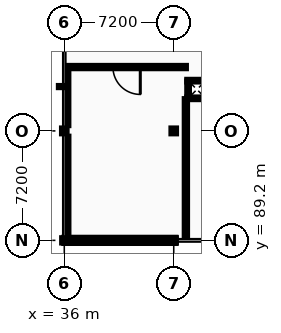
"""IFC4 building model, lengths in metres.
Left out: names, types, materials, properties, quantities, classifications, styles, units other than length and angle.
Written with IfcOpenShell. Run it as: python <this file> out.ifc"""

import sys

from ifc_helpers import new_model, si_unit, direction, frame, frame_2d, origin, origin_2d, place, context, subcontext, project, spatial, rectangle, i_section, extrude, element, fill, save


model = new_model("IFC4")
c1 = context("Model", 3, precision=1e-05, world=origin(), true_north=direction((0.0, 1.0)))
c2 = subcontext(c1, "Body", "Model", "MODEL_VIEW")
j1 = project(units=[si_unit("LENGTHUNIT", "METRE"), si_unit("PLANEANGLEUNIT", "RADIAN")], contexts=[c1])
p1 = place(None, origin())
s1 = spatial("IfcSite", under=j1, at=p1, CompositionType="ELEMENT")
p2 = place(p1, origin())
s2 = spatial("IfcBuilding", under=s1, at=p2, CompositionType="ELEMENT")
p3 = place(p2, frame((0.0, 0.0, 18.4)))
s3 = spatial("IfcBuildingStorey", under=s2, at=p3, CompositionType="ELEMENT", Elevation=18.4)
p4 = place(p3, frame((36.0, 89.2, 0.0), z_axis=(0.0, 0.0, 1.0), x_axis=(1.0, 0.0, 0.0)))
e1 = element("IfcColumn", 1, at=p4, inside=s3, PredefinedType="COLUMN", context=c2, shape_type="SweptSolid", body=[
    extrude(i_section(OverallWidth=0.28, OverallDepth=0.28, WebThickness=0.01, FlangeThickness=0.018, FilletRadius=0.024, at=origin_2d()), origin(), (0.0, 0.0, 1.0), 4.4),
])
p5 = place(p3, frame((36.0, 96.4, 0.0), z_axis=(0.0, 0.0, 1.0), x_axis=(1.0, 0.0, 0.0)))
e2 = element("IfcColumn", 2, at=p5, inside=s3, PredefinedType="COLUMN", context=c2, shape_type="SweptSolid", body=[
    extrude(i_section(OverallWidth=0.3, OverallDepth=0.32, WebThickness=0.011, FlangeThickness=0.021, FilletRadius=0.027, at=origin_2d()), origin(), (0.0, 0.0, 1.0), 4.4),
])
p6 = place(p3, frame((43.2, 89.2, 0.0), z_axis=(0.0, 0.0, 1.0), x_axis=(1.0, 0.0, 0.0)))
e3 = element("IfcColumn", 3, at=p6, inside=s3, PredefinedType="COLUMN", context=c2, shape_type="SweptSolid", body=[
    extrude(i_section(OverallWidth=0.28, OverallDepth=0.28, WebThickness=0.01, FlangeThickness=0.018, FilletRadius=0.024, at=origin_2d()), origin(), (0.0, 0.0, 1.0), 4.4),
])
p7 = place(p3, frame((43.2, 96.4, 0.0), z_axis=(0.0, 0.0, 1.0), x_axis=(1.0, 0.0, 0.0)))
e4 = element("IfcColumn", 4, at=p7, inside=s3, PredefinedType="COLUMN", context=c2, shape_type="SweptSolid", body=[
    extrude(i_section(OverallWidth=0.3, OverallDepth=0.32, WebThickness=0.011, FlangeThickness=0.021, FilletRadius=0.027, at=origin_2d()), origin(), (0.0, 0.0, 1.0), 4.4),
])
p8 = place(p3, frame((36.0, 89.2, 0.0), z_axis=(0.0, 0.0, 1.0), x_axis=(1.0, 0.0, 0.0)))
e5 = element("IfcWall", 5, at=p8, inside=s3, PredefinedType="STANDARD", context=c2, shape_type="SweptSolid", body=[
    extrude(rectangle(XDim=7.31, YDim=0.34, at=frame_2d((3.655, 0.0))), origin(), (0.0, 0.0, 1.0), 3.94),
])
p9 = place(p8, frame((1.678, 0.0, 0.95)))
e6 = element("IfcOpeningElement", 6, at=p9, cuts=e5, PredefinedType="OPENING", context=c2, shape_type="SweptSolid", body=[
    extrude(rectangle(XDim=1.03, YDim=1.26, at=frame_2d((0.515, 0.63))), frame((0.0, 0.18, 0.0), z_axis=(0.0, -1.0, 0.0), x_axis=(1.0, 0.0, 0.0)), (0.0, 0.0, 1.0), 0.36),
])
p10 = place(p8, frame((4.602, 0.0, 0.95)))
e7 = element("IfcOpeningElement", 7, at=p10, cuts=e5, PredefinedType="OPENING", context=c2, shape_type="SweptSolid", body=[
    extrude(rectangle(XDim=1.03, YDim=1.26, at=frame_2d((0.515, 0.63))), frame((0.0, 0.18, 0.0), z_axis=(0.0, -1.0, 0.0), x_axis=(1.0, 0.0, 0.0)), (0.0, 0.0, 1.0), 0.36),
])
for number, where, z_axis, x_axis in (
    (8, (44.09, 98.545, 0.0), (0.0, 0.0, 1.0), (1.0, 0.0, 0.0)),
    (9, (44.09, 99.705, 0.0), (0.0, 0.0, 1.0), (1.0, 0.0, 0.0)),
):
    element("IfcWall", number, at=place(p3, frame(where, z_axis=z_axis, x_axis=x_axis)), inside=s3, PredefinedType="PARTITIONING", context=c2, shape_type="SweptSolid", body=[
        extrude(rectangle(XDim=1.27, YDim=0.11, at=frame_2d((0.635, 0.0))), origin(), (0.0, 0.0, 1.0), 4.215),
    ])
p11 = place(p3, frame((44.145, 98.6, 0.0), z_axis=(0.0, 0.0, 1.0), x_axis=(0.0, 1.0, 0.0)))
e10 = element("IfcWall", 10, at=p11, inside=s3, PredefinedType="PARTITIONING", context=c2, shape_type="SweptSolid", body=[
    extrude(rectangle(XDim=1.05, YDim=0.11, at=frame_2d((0.525, 0.0))), origin(), (0.0, 0.0, 1.0), 4.215),
])
p12 = place(p3, frame((36.2, 100.6, 0.0), z_axis=(0.0, 0.0, 1.0), x_axis=(1.0, 0.0, 0.0)))
e11 = element("IfcWall", 11, at=p12, inside=s3, PredefinedType="PARTITIONING", context=c2, shape_type="SweptSolid", body=[
    extrude(rectangle(XDim=7.8, YDim=0.15, at=frame_2d((3.9, 0.0))), origin(), (0.0, 0.0, 1.0), 4.215),
])
p13 = place(p12, frame((3.0, 0.0, 0.0)))
e12 = element("IfcOpeningElement", 12, at=p13, cuts=e11, PredefinedType="OPENING", context=c2, shape_type="SweptSolid", body=[
    extrude(rectangle(XDim=1.8, YDim=2.3, at=frame_2d((0.9, 1.15))), frame((0.0, 0.085, 0.0), z_axis=(0.0, -1.0, 0.0), x_axis=(1.0, 0.0, 0.0)), (0.0, 0.0, 1.0), 0.17),
])
p14 = place(p3, frame((36.2, 89.58, 0.0), z_axis=(0.0, 0.0, 1.0), x_axis=(0.0, 1.0, 0.0)))
e13 = element("IfcWall", 13, at=p14, inside=s3, PredefinedType="PARTITIONING", context=c2, shape_type="SweptSolid", body=[
    extrude(rectangle(XDim=6.44, YDim=0.142, at=frame_2d((3.22, 0.0))), origin(), (0.0, 0.0, 1.0), 3.89),
])
p15 = place(p3, frame((36.2, 96.78, 0.0), z_axis=(0.0, 0.0, 1.0), x_axis=(0.0, 1.0, 0.0)))
e14 = element("IfcWall", 14, at=p15, inside=s3, PredefinedType="PARTITIONING", context=c2, shape_type="SweptSolid", body=[
    extrude(rectangle(XDim=3.745, YDim=0.135, at=frame_2d((1.873, 0.0))), origin(), (0.0, 0.0, 1.0), 3.9),
])
p16 = place(p3, frame((44.0, 89.4, 0.0), z_axis=(0.0, 0.0, 1.0), x_axis=(0.0, 1.0, 0.0)))
e15 = element("IfcWall", 15, at=p16, inside=s3, PredefinedType="PARTITIONING", context=c2, shape_type="SweptSolid", body=[
    extrude(rectangle(XDim=9.09, YDim=0.15, at=frame_2d((4.545, 0.0))), origin(), (0.0, 0.0, 1.0), 4.215),
])
p17 = place(p9, origin())
e16 = element("IfcWindow", 16, at=p17, inside=s3, PartitioningType="SINGLE_PANEL", PredefinedType="WINDOW", context=c2, shape_type="SweptSolid", body=[
    extrude(rectangle(XDim=1.03, YDim=1.26, at=frame_2d((0.515, 0.63))), frame((0.0, 0.03, 0.0), z_axis=(0.0, -1.0, 0.0), x_axis=(1.0, 0.0, 0.0)), (0.0, 0.0, 1.0), 0.06),
])
fill(e6, e16)
p18 = place(p10, origin())
e17 = element("IfcWindow", 17, at=p18, inside=s3, PartitioningType="SINGLE_PANEL", PredefinedType="WINDOW", context=c2, shape_type="SweptSolid", body=[
    extrude(rectangle(XDim=1.03, YDim=1.26, at=frame_2d((0.515, 0.63))), frame((0.0, 0.03, 0.0), z_axis=(0.0, -1.0, 0.0), x_axis=(1.0, 0.0, 0.0)), (0.0, 0.0, 1.0), 0.06),
])
fill(e7, e17)
p19 = place(p13, origin())
e18 = element("IfcDoor", 18, at=p19, inside=s3, OperationType="DOUBLE_DOOR_SINGLE_SWING", PredefinedType="DOOR", context=c2, shape_type="SweptSolid", body=[
    extrude(rectangle(XDim=1.8, YDim=2.3, at=frame_2d((0.9, 1.15))), frame((0.0, 0.025, 0.0), z_axis=(0.0, -1.0, 0.0), x_axis=(1.0, 0.0, 0.0)), (0.0, 0.0, 1.0), 0.05),
])
fill(e12, e18)
save(model, sys.argv[1])
